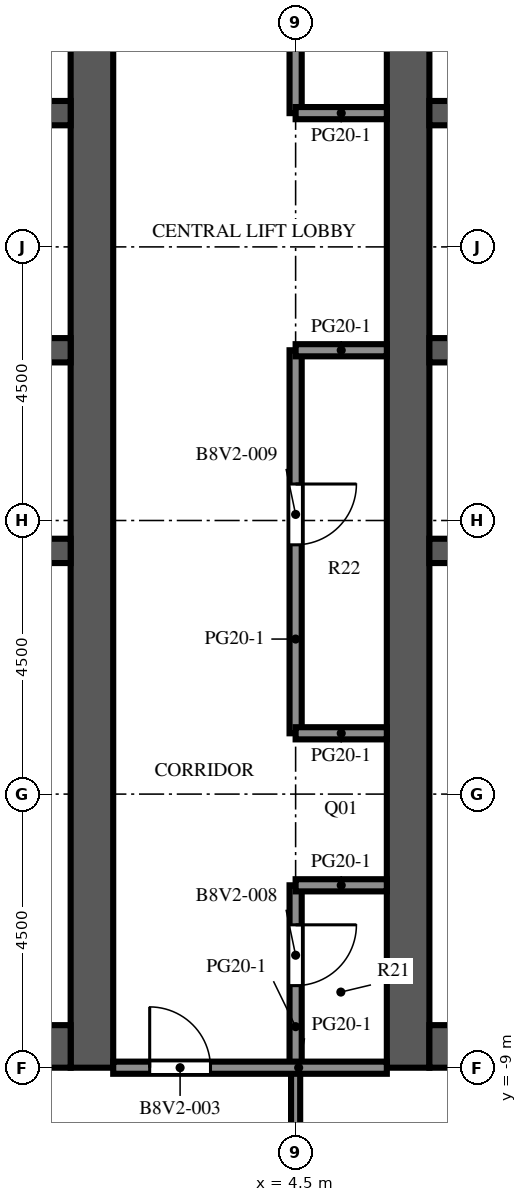
"""IFC4 building model, lengths in metres.
Left out: names, types, materials, properties, quantities, classifications, styles, units other than length and angle.
Written with IfcOpenShell. Run it as: python <this file> out.ifc"""

import sys

from ifc_helpers import new_model, si_unit, direction, frame, frame_2d, origin, place, context, subcontext, project, spatial, rectangle, extrude, element, fill, save


model = new_model("IFC4")
c1 = context("Model", 3, precision=1e-05, world=origin(), true_north=direction((0.0, 1.0)))
c2 = subcontext(c1, "Body", "Model", "MODEL_VIEW")
j1 = project(units=[si_unit("LENGTHUNIT", "METRE"), si_unit("PLANEANGLEUNIT", "RADIAN")], contexts=[c1])
p1 = place(None, origin())
s1 = spatial("IfcSite", under=j1, at=p1, CompositionType="ELEMENT")
p2 = place(p1, origin())
s2 = spatial("IfcBuilding", under=s1, at=p2, CompositionType="ELEMENT")
p3 = place(p2, frame((0.0, 0.0, 286.8)))
s3 = spatial("IfcBuildingStorey", under=s2, at=p3, CompositionType="ELEMENT", Elevation=286.8)
p4 = place(p3, frame((1.15, -9.0, 0.0), z_axis=(0.0, 0.0, 1.0), x_axis=(0.0, 1.0, 0.0)))
e1 = element("IfcWall", 1, at=p4, inside=s3, PredefinedType="SHEAR", context=c2, shape_type="SweptSolid", body=[
    extrude(rectangle(XDim=27.5, YDim=0.7, at=frame_2d((13.75, 0.0))), origin(), (0.0, 0.0, 1.0), 4.1),
])
p5 = place(p4, frame((12.55, 0.0, 0.0)))
e2 = element("IfcOpeningElement", 2, at=p5, cuts=e1, PredefinedType="OPENING", context=c2, shape_type="SweptSolid", body=[
    extrude(rectangle(XDim=2.4, YDim=2.4, at=frame_2d((1.2, 1.2))), frame((0.0, 0.36, 0.0), z_axis=(0.0, -1.0, 0.0), x_axis=(1.0, 0.0, 0.0)), (0.0, 0.0, 1.0), 0.72),
])
p6 = place(p4, frame((3.9, 0.0, 0.0)))
e3 = element("IfcOpeningElement", 3, at=p6, cuts=e1, PredefinedType="OPENING", context=c2, shape_type="SweptSolid", body=[
    extrude(rectangle(XDim=1.2, YDim=2.1, at=frame_2d((0.6, 1.05))), frame((0.0, 0.36, 0.0), z_axis=(0.0, -1.0, 0.0), x_axis=(1.0, 0.0, 0.0)), (0.0, 0.0, 1.0), 0.72),
])
p7 = place(p4, frame((22.4, 0.0, 0.0)))
e4 = element("IfcOpeningElement", 4, at=p7, cuts=e1, PredefinedType="OPENING", context=c2, shape_type="SweptSolid", body=[
    extrude(rectangle(XDim=1.2, YDim=2.1, at=frame_2d((0.6, 1.05))), frame((0.0, 0.36, 0.0), z_axis=(0.0, -1.0, 0.0), x_axis=(1.0, 0.0, 0.0)), (0.0, 0.0, 1.0), 0.72),
])
p8 = place(p3, frame((-9.8, -8.65, 0.0), z_axis=(0.0, 0.0, 1.0), x_axis=(1.0, 0.0, 0.0)))
e5 = element("IfcWall", 5, at=p8, inside=s3, PredefinedType="SHEAR", context=c2, shape_type="SweptSolid", body=[
    extrude(rectangle(XDim=10.6, YDim=0.7, at=frame_2d((5.3, 0.0))), origin(), (0.0, 0.0, 1.0), 4.1),
])
p9 = place(p3, frame((-9.8, -0.5, 0.0), z_axis=(0.0, 0.0, 1.0), x_axis=(1.0, 0.0, 0.0)))
e6 = element("IfcWall", 6, at=p9, inside=s3, PredefinedType="SHEAR", context=c2, shape_type="SweptSolid", body=[
    extrude(rectangle(XDim=10.6, YDim=0.4, at=frame_2d((5.3, 0.0))), origin(), (0.0, 0.0, 1.0), 4.1),
])
p10 = place(p3, frame((-9.8, 2.8, 0.0), z_axis=(0.0, 0.0, 1.0), x_axis=(1.0, 0.0, 0.0)))
e7 = element("IfcWall", 7, at=p10, inside=s3, PredefinedType="SHEAR", context=c2, shape_type="SweptSolid", body=[
    extrude(rectangle(XDim=10.6, YDim=0.4, at=frame_2d((5.3, 0.0))), origin(), (0.0, 0.0, 1.0), 4.1),
])
p11 = place(p10, frame((0.688, 0.0, 0.0)))
e8 = element("IfcOpeningElement", 8, at=p11, cuts=e7, PredefinedType="OPENING", context=c2, shape_type="SweptSolid", body=[
    extrude(rectangle(XDim=1.1, YDim=2.1, at=frame_2d((0.55, 1.05))), frame((0.0, 0.21, 0.0), z_axis=(0.0, -1.0, 0.0), x_axis=(1.0, 0.0, 0.0)), (0.0, 0.0, 1.0), 0.42),
])
p12 = place(p10, frame((3.438, 0.0, 0.0)))
e9 = element("IfcOpeningElement", 9, at=p12, cuts=e7, PredefinedType="OPENING", context=c2, shape_type="SweptSolid", body=[
    extrude(rectangle(XDim=1.1, YDim=2.1, at=frame_2d((0.55, 1.05))), frame((0.0, 0.21, 0.0), z_axis=(0.0, -1.0, 0.0), x_axis=(1.0, 0.0, 0.0)), (0.0, 0.0, 1.0), 0.42),
])
p13 = place(p10, frame((6.113, 0.0, 0.0)))
e10 = element("IfcOpeningElement", 10, at=p13, cuts=e7, PredefinedType="OPENING", context=c2, shape_type="SweptSolid", body=[
    extrude(rectangle(XDim=1.0, YDim=2.1, at=frame_2d((0.5, 1.05))), frame((0.0, 0.21, 0.0), z_axis=(0.0, -1.0, 0.0), x_axis=(1.0, 0.0, 0.0)), (0.0, 0.0, 1.0), 0.42),
])
p14 = place(p10, frame((8.863, 0.0, 0.0)))
e11 = element("IfcOpeningElement", 11, at=p14, cuts=e7, PredefinedType="OPENING", context=c2, shape_type="SweptSolid", body=[
    extrude(rectangle(XDim=1.0, YDim=2.1, at=frame_2d((0.5, 1.05))), frame((0.0, 0.21, 0.0), z_axis=(0.0, -1.0, 0.0), x_axis=(1.0, 0.0, 0.0)), (0.0, 0.0, 1.0), 0.42),
])
p15 = place(p3, frame((-9.8, 6.7, 0.0), z_axis=(0.0, 0.0, 1.0), x_axis=(1.0, 0.0, 0.0)))
e12 = element("IfcWall", 12, at=p15, inside=s3, PredefinedType="SHEAR", context=c2, shape_type="SweptSolid", body=[
    extrude(rectangle(XDim=10.6, YDim=0.4, at=frame_2d((5.3, 0.0))), origin(), (0.0, 0.0, 1.0), 4.1),
])
p16 = place(p15, frame((3.438, 0.0, 0.0)))
e13 = element("IfcOpeningElement", 13, at=p16, cuts=e12, PredefinedType="OPENING", context=c2, shape_type="SweptSolid", body=[
    extrude(rectangle(XDim=1.1, YDim=2.1, at=frame_2d((0.55, 1.05))), frame((0.0, 0.21, 0.0), z_axis=(0.0, -1.0, 0.0), x_axis=(1.0, 0.0, 0.0)), (0.0, 0.0, 1.0), 0.42),
])
p17 = place(p15, frame((6.062, 0.0, 0.0)))
e14 = element("IfcOpeningElement", 14, at=p17, cuts=e12, PredefinedType="OPENING", context=c2, shape_type="SweptSolid", body=[
    extrude(rectangle(XDim=1.1, YDim=2.1, at=frame_2d((0.55, 1.05))), frame((0.0, 0.21, 0.0), z_axis=(0.0, -1.0, 0.0), x_axis=(1.0, 0.0, 0.0)), (0.0, 0.0, 1.0), 0.42),
])
p18 = place(p15, frame((8.812, 0.0, 0.0)))
e15 = element("IfcOpeningElement", 15, at=p18, cuts=e12, PredefinedType="OPENING", context=c2, shape_type="SweptSolid", body=[
    extrude(rectangle(XDim=1.1, YDim=2.1, at=frame_2d((0.55, 1.05))), frame((0.0, 0.21, 0.0), z_axis=(0.0, -1.0, 0.0), x_axis=(1.0, 0.0, 0.0)), (0.0, 0.0, 1.0), 0.42),
])
p19 = place(p15, frame((0.738, 0.0, 0.0)))
e16 = element("IfcOpeningElement", 16, at=p19, cuts=e12, PredefinedType="OPENING", context=c2, shape_type="SweptSolid", body=[
    extrude(rectangle(XDim=1.0, YDim=2.1, at=frame_2d((0.5, 1.05))), frame((0.0, 0.21, 0.0), z_axis=(0.0, -1.0, 0.0), x_axis=(1.0, 0.0, 0.0)), (0.0, 0.0, 1.0), 0.42),
])
p20 = place(p3, frame((6.35, -9.0, 0.0), z_axis=(0.0, 0.0, 1.0), x_axis=(0.0, 1.0, 0.0)))
e17 = element("IfcWall", 17, at=p20, inside=s3, PredefinedType="SHEAR", context=c2, shape_type="SweptSolid", body=[
    extrude(rectangle(XDim=27.5, YDim=0.7, at=frame_2d((13.75, 0.0))), origin(), (0.0, 0.0, 1.0), 4.1),
])
p21 = place(p20, frame((12.55, 0.0, 0.0)))
e18 = element("IfcOpeningElement", 18, at=p21, cuts=e17, PredefinedType="OPENING", context=c2, shape_type="SweptSolid", body=[
    extrude(rectangle(XDim=2.4, YDim=2.4, at=frame_2d((1.2, 1.2))), frame((0.0, 0.36, 0.0), z_axis=(0.0, -1.0, 0.0), x_axis=(1.0, 0.0, 0.0)), (0.0, 0.0, 1.0), 0.72),
])
p22 = place(p20, frame((3.9, 0.0, 0.0)))
e19 = element("IfcOpeningElement", 19, at=p22, cuts=e17, PredefinedType="OPENING", context=c2, shape_type="SweptSolid", body=[
    extrude(rectangle(XDim=1.2, YDim=2.1, at=frame_2d((0.6, 1.05))), frame((0.0, 0.36, 0.0), z_axis=(0.0, -1.0, 0.0), x_axis=(1.0, 0.0, 0.0)), (0.0, 0.0, 1.0), 0.72),
])
p23 = place(p20, frame((22.4, 0.0, 0.0)))
e20 = element("IfcOpeningElement", 20, at=p23, cuts=e17, PredefinedType="OPENING", context=c2, shape_type="SweptSolid", body=[
    extrude(rectangle(XDim=1.2, YDim=2.1, at=frame_2d((0.6, 1.05))), frame((0.0, 0.36, 0.0), z_axis=(0.0, -1.0, 0.0), x_axis=(1.0, 0.0, 0.0)), (0.0, 0.0, 1.0), 0.72),
])
p24 = place(p3, frame((6.7, -8.65, 0.0), z_axis=(0.0, 0.0, 1.0), x_axis=(1.0, 0.0, 0.0)))
e21 = element("IfcWall", 21, at=p24, inside=s3, PredefinedType="SHEAR", context=c2, shape_type="SweptSolid", body=[
    extrude(rectangle(XDim=10.6, YDim=0.7, at=frame_2d((5.3, 0.0))), origin(), (0.0, 0.0, 1.0), 4.1),
])
p25 = place(p3, frame((6.7, -0.5, 0.0), z_axis=(0.0, 0.0, 1.0), x_axis=(1.0, 0.0, 0.0)))
e22 = element("IfcWall", 22, at=p25, inside=s3, PredefinedType="SHEAR", context=c2, shape_type="SweptSolid", body=[
    extrude(rectangle(XDim=10.6, YDim=0.4, at=frame_2d((5.3, 0.0))), origin(), (0.0, 0.0, 1.0), 4.1),
])
p26 = place(p3, frame((6.7, 2.8, 0.0), z_axis=(0.0, 0.0, 1.0), x_axis=(1.0, 0.0, 0.0)))
e23 = element("IfcWall", 23, at=p26, inside=s3, PredefinedType="SHEAR", context=c2, shape_type="SweptSolid", body=[
    extrude(rectangle(XDim=10.6, YDim=0.4, at=frame_2d((5.3, 0.0))), origin(), (0.0, 0.0, 1.0), 4.1),
])
p27 = place(p26, frame((0.688, 0.0, 0.0)))
e24 = element("IfcOpeningElement", 24, at=p27, cuts=e23, PredefinedType="OPENING", context=c2, shape_type="SweptSolid", body=[
    extrude(rectangle(XDim=1.1, YDim=2.1, at=frame_2d((0.55, 1.05))), frame((0.0, 0.21, 0.0), z_axis=(0.0, -1.0, 0.0), x_axis=(1.0, 0.0, 0.0)), (0.0, 0.0, 1.0), 0.42),
])
p28 = place(p26, frame((3.438, 0.0, 0.0)))
e25 = element("IfcOpeningElement", 25, at=p28, cuts=e23, PredefinedType="OPENING", context=c2, shape_type="SweptSolid", body=[
    extrude(rectangle(XDim=1.1, YDim=2.1, at=frame_2d((0.55, 1.05))), frame((0.0, 0.21, 0.0), z_axis=(0.0, -1.0, 0.0), x_axis=(1.0, 0.0, 0.0)), (0.0, 0.0, 1.0), 0.42),
])
p29 = place(p26, frame((6.113, 0.0, 0.0)))
e26 = element("IfcOpeningElement", 26, at=p29, cuts=e23, PredefinedType="OPENING", context=c2, shape_type="SweptSolid", body=[
    extrude(rectangle(XDim=1.0, YDim=2.1, at=frame_2d((0.5, 1.05))), frame((0.0, 0.21, 0.0), z_axis=(0.0, -1.0, 0.0), x_axis=(1.0, 0.0, 0.0)), (0.0, 0.0, 1.0), 0.42),
])
p30 = place(p26, frame((8.863, 0.0, 0.0)))
e27 = element("IfcOpeningElement", 27, at=p30, cuts=e23, PredefinedType="OPENING", context=c2, shape_type="SweptSolid", body=[
    extrude(rectangle(XDim=1.0, YDim=2.1, at=frame_2d((0.5, 1.05))), frame((0.0, 0.21, 0.0), z_axis=(0.0, -1.0, 0.0), x_axis=(1.0, 0.0, 0.0)), (0.0, 0.0, 1.0), 0.42),
])
p31 = place(p3, frame((6.7, 6.7, 0.0), z_axis=(0.0, 0.0, 1.0), x_axis=(1.0, 0.0, 0.0)))
e28 = element("IfcWall", 28, at=p31, inside=s3, PredefinedType="SHEAR", context=c2, shape_type="SweptSolid", body=[
    extrude(rectangle(XDim=10.6, YDim=0.4, at=frame_2d((5.3, 0.0))), origin(), (0.0, 0.0, 1.0), 4.1),
])
p32 = place(p31, frame((3.438, 0.0, 0.0)))
e29 = element("IfcOpeningElement", 29, at=p32, cuts=e28, PredefinedType="OPENING", context=c2, shape_type="SweptSolid", body=[
    extrude(rectangle(XDim=1.1, YDim=2.1, at=frame_2d((0.55, 1.05))), frame((0.0, 0.21, 0.0), z_axis=(0.0, -1.0, 0.0), x_axis=(1.0, 0.0, 0.0)), (0.0, 0.0, 1.0), 0.42),
])
p33 = place(p31, frame((6.062, 0.0, 0.0)))
e30 = element("IfcOpeningElement", 30, at=p33, cuts=e28, PredefinedType="OPENING", context=c2, shape_type="SweptSolid", body=[
    extrude(rectangle(XDim=1.1, YDim=2.1, at=frame_2d((0.55, 1.05))), frame((0.0, 0.21, 0.0), z_axis=(0.0, -1.0, 0.0), x_axis=(1.0, 0.0, 0.0)), (0.0, 0.0, 1.0), 0.42),
])
p34 = place(p31, frame((8.812, 0.0, 0.0)))
e31 = element("IfcOpeningElement", 31, at=p34, cuts=e28, PredefinedType="OPENING", context=c2, shape_type="SweptSolid", body=[
    extrude(rectangle(XDim=1.1, YDim=2.1, at=frame_2d((0.55, 1.05))), frame((0.0, 0.21, 0.0), z_axis=(0.0, -1.0, 0.0), x_axis=(1.0, 0.0, 0.0)), (0.0, 0.0, 1.0), 0.42),
])
p35 = place(p31, frame((0.738, 0.0, 0.0)))
e32 = element("IfcOpeningElement", 32, at=p35, cuts=e28, PredefinedType="OPENING", context=c2, shape_type="SweptSolid", body=[
    extrude(rectangle(XDim=1.0, YDim=2.1, at=frame_2d((0.5, 1.05))), frame((0.0, 0.21, 0.0), z_axis=(0.0, -1.0, 0.0), x_axis=(1.0, 0.0, 0.0)), (0.0, 0.0, 1.0), 0.42),
])
p36 = place(p3, frame((4.5, -9.0, 0.0), z_axis=(0.0, 0.0, 1.0), x_axis=(0.0, -1.0, 0.0)))
e33 = element("IfcWall", 33, at=p36, inside=s3, PredefinedType="PARTITIONING", context=c2, shape_type="SweptSolid", body=[
    extrude(rectangle(XDim=8.6, YDim=0.15, at=frame_2d((4.3, 0.0))), origin(), (0.0, 0.0, 1.0), 3.65),
])
p37 = place(p36, frame((2.9, 0.0, 0.0)))
e34 = element("IfcOpeningElement", 34, at=p37, cuts=e33, PredefinedType="OPENING", context=c2, shape_type="SweptSolid", body=[
    extrude(rectangle(XDim=1.0, YDim=2.1, at=frame_2d((0.5, 1.05))), frame((0.0, 0.085, 0.0), z_axis=(0.0, -1.0, 0.0), x_axis=(1.0, 0.0, 0.0)), (0.0, 0.0, 1.0), 0.17),
])
p38 = place(p3, frame((4.5, -6.0, 0.0), z_axis=(0.0, 0.0, 1.0), x_axis=(0.0, -1.0, 0.0)))
e35 = element("IfcWall", 35, at=p38, inside=s3, PredefinedType="PARTITIONING", context=c2, shape_type="SweptSolid", body=[
    extrude(rectangle(XDim=3.0, YDim=0.2, at=frame_2d((1.5, 0.0))), origin(), (0.0, 0.0, 1.0), 3.65),
])
p39 = place(p38, frame((0.65, 0.0, 0.0)))
e36 = element("IfcOpeningElement", 36, at=p39, cuts=e35, PredefinedType="OPENING", context=c2, shape_type="SweptSolid", body=[
    extrude(rectangle(XDim=1.0, YDim=2.1, at=frame_2d((0.5, 1.05))), frame((0.0, 0.11, 0.0), z_axis=(0.0, -1.0, 0.0), x_axis=(1.0, 0.0, 0.0)), (0.0, 0.0, 1.0), 0.22),
])
p40 = place(p3, frame((4.5, 2.8, 0.0), z_axis=(0.0, 0.0, 1.0), x_axis=(0.0, -1.0, 0.0)))
e37 = element("IfcWall", 37, at=p40, inside=s3, PredefinedType="PARTITIONING", context=c2, shape_type="SweptSolid", body=[
    extrude(rectangle(XDim=6.3, YDim=0.2, at=frame_2d((3.15, 0.0))), origin(), (0.0, 0.0, 1.0), 3.65),
])
p41 = place(p40, frame((2.2, 0.0, 0.0)))
e38 = element("IfcOpeningElement", 38, at=p41, cuts=e37, PredefinedType="OPENING", context=c2, shape_type="SweptSolid", body=[
    extrude(rectangle(XDim=1.0, YDim=2.1, at=frame_2d((0.5, 1.05))), frame((0.0, 0.11, 0.0), z_axis=(0.0, -1.0, 0.0), x_axis=(1.0, 0.0, 0.0)), (0.0, 0.0, 1.0), 0.22),
])
p42 = place(p3, frame((4.5, 18.5, 0.0), z_axis=(0.0, 0.0, 1.0), x_axis=(0.0, -1.0, 0.0)))
e39 = element("IfcWall", 39, at=p42, inside=s3, PredefinedType="PARTITIONING", context=c2, shape_type="SweptSolid", body=[
    extrude(rectangle(XDim=11.8, YDim=0.2, at=frame_2d((5.9, 0.0))), origin(), (0.0, 0.0, 1.0), 3.65),
])
p43 = place(p42, frame((5.2, 0.0, 0.0)))
e40 = element("IfcOpeningElement", 40, at=p43, cuts=e39, PredefinedType="OPENING", context=c2, shape_type="SweptSolid", body=[
    extrude(rectangle(XDim=1.0, YDim=2.1, at=frame_2d((0.5, 1.05))), frame((0.0, 0.11, 0.0), z_axis=(0.0, -1.0, 0.0), x_axis=(1.0, 0.0, 0.0)), (0.0, 0.0, 1.0), 0.22),
])
p44 = place(p3, frame((6.0, -9.0, 0.0), z_axis=(0.0, 0.0, 1.0), x_axis=(-1.0, 0.0, 0.0)))
e41 = element("IfcWall", 41, at=p44, inside=s3, PredefinedType="PARTITIONING", context=c2, shape_type="SweptSolid", body=[
    extrude(rectangle(XDim=4.5, YDim=0.2, at=frame_2d((2.25, 0.0))), origin(), (0.0, 0.0, 1.0), 3.65),
])
p45 = place(p44, frame((2.9, 0.0, 0.0)))
e42 = element("IfcOpeningElement", 42, at=p45, cuts=e41, PredefinedType="OPENING", context=c2, shape_type="SweptSolid", body=[
    extrude(rectangle(XDim=1.0, YDim=2.1, at=frame_2d((0.5, 1.05))), frame((0.0, 0.11, 0.0), z_axis=(0.0, -1.0, 0.0), x_axis=(1.0, 0.0, 0.0)), (0.0, 0.0, 1.0), 0.22),
])
for number, where, z_axis, x_axis in (
    (43, (4.5, -6.0, 0.0), (0.0, 0.0, 1.0), (1.0, 0.0, 0.0)),
    (44, (4.5, -3.5, 0.0), (0.0, 0.0, 1.0), (1.0, 0.0, 0.0)),
    (45, (4.5, 2.8, 0.0), (0.0, 0.0, 1.0), (1.0, 0.0, 0.0)),
    (46, (4.5, 6.7, 0.0), (0.0, 0.0, 1.0), (1.0, 0.0, 0.0)),
):
    element("IfcWall", number, at=place(p3, frame(where, z_axis=z_axis, x_axis=x_axis)), inside=s3, PredefinedType="PARTITIONING", context=c2, shape_type="SweptSolid", body=[
        extrude(rectangle(XDim=1.5, YDim=0.2, at=frame_2d((0.75, 0.0))), origin(), (0.0, 0.0, 1.0), 3.65),
    ])
p46 = place(p5, origin())
e47 = element("IfcDoor", 47, at=p46, inside=s3, OperationType="DOUBLE_DOOR_DOUBLE_SWING", PredefinedType="DOOR", context=c2, shape_type="SweptSolid", body=[
    extrude(rectangle(XDim=2.4, YDim=2.4, at=frame_2d((1.2, 1.2))), frame((0.0, 0.025, 0.0), z_axis=(0.0, -1.0, 0.0), x_axis=(1.0, 0.0, 0.0)), (0.0, 0.0, 1.0), 0.05),
])
fill(e2, e47)
p47 = place(p21, origin())
e48 = element("IfcDoor", 48, at=p47, inside=s3, OperationType="DOUBLE_DOOR_DOUBLE_SWING", PredefinedType="DOOR", context=c2, shape_type="SweptSolid", body=[
    extrude(rectangle(XDim=2.4, YDim=2.4, at=frame_2d((1.2, 1.2))), frame((0.0, 0.025, 0.0), z_axis=(0.0, -1.0, 0.0), x_axis=(1.0, 0.0, 0.0)), (0.0, 0.0, 1.0), 0.05),
])
fill(e18, e48)
p48 = place(p6, origin())
e49 = element("IfcDoor", 49, at=p48, inside=s3, OperationType="SINGLE_SWING_LEFT", PredefinedType="DOOR", context=c2, shape_type="SweptSolid", body=[
    extrude(rectangle(XDim=1.2, YDim=2.1, at=frame_2d((0.6, 1.05))), frame((0.0, 0.325, 0.0), z_axis=(0.0, -1.0, 0.0), x_axis=(1.0, 0.0, 0.0)), (0.0, 0.0, 1.0), 0.05),
])
fill(e3, e49)
p49 = place(p22, origin())
e50 = element("IfcDoor", 50, at=p49, inside=s3, OperationType="SINGLE_SWING_RIGHT", PredefinedType="DOOR", context=c2, shape_type="SweptSolid", body=[
    extrude(rectangle(XDim=1.2, YDim=2.1, at=frame_2d((0.6, 1.05))), frame((0.0, -0.275, 0.0), z_axis=(0.0, -1.0, 0.0), x_axis=(1.0, 0.0, 0.0)), (0.0, 0.0, 1.0), 0.05),
])
fill(e19, e50)
p50 = place(p45, origin())
e51 = element("IfcDoor", 51, at=p50, inside=s3, OperationType="SINGLE_SWING_RIGHT", PredefinedType="DOOR", context=c2, shape_type="SweptSolid", body=[
    extrude(rectangle(XDim=1.0, YDim=2.1, at=frame_2d((0.5, 1.05))), frame((0.0, 0.025, 0.0), z_axis=(0.0, -1.0, 0.0), x_axis=(1.0, 0.0, 0.0)), (0.0, 0.0, 1.0), 0.05),
])
fill(e42, e51)
p51 = place(p39, origin())
e52 = element("IfcDoor", 52, at=p51, inside=s3, OperationType="SINGLE_SWING_LEFT", PredefinedType="DOOR", context=c2, shape_type="SweptSolid", body=[
    extrude(rectangle(XDim=1.0, YDim=2.1, at=frame_2d((0.5, 1.05))), frame((0.0, 0.025, 0.0), z_axis=(0.0, -1.0, 0.0), x_axis=(1.0, 0.0, 0.0)), (0.0, 0.0, 1.0), 0.05),
])
fill(e36, e52)
p52 = place(p41, origin())
e53 = element("IfcDoor", 53, at=p52, inside=s3, OperationType="SINGLE_SWING_LEFT", PredefinedType="DOOR", context=c2, shape_type="SweptSolid", body=[
    extrude(rectangle(XDim=1.0, YDim=2.1, at=frame_2d((0.5, 1.05))), frame((0.0, 0.025, 0.0), z_axis=(0.0, -1.0, 0.0), x_axis=(1.0, 0.0, 0.0)), (0.0, 0.0, 1.0), 0.05),
])
fill(e38, e53)
save(model, sys.argv[1])
